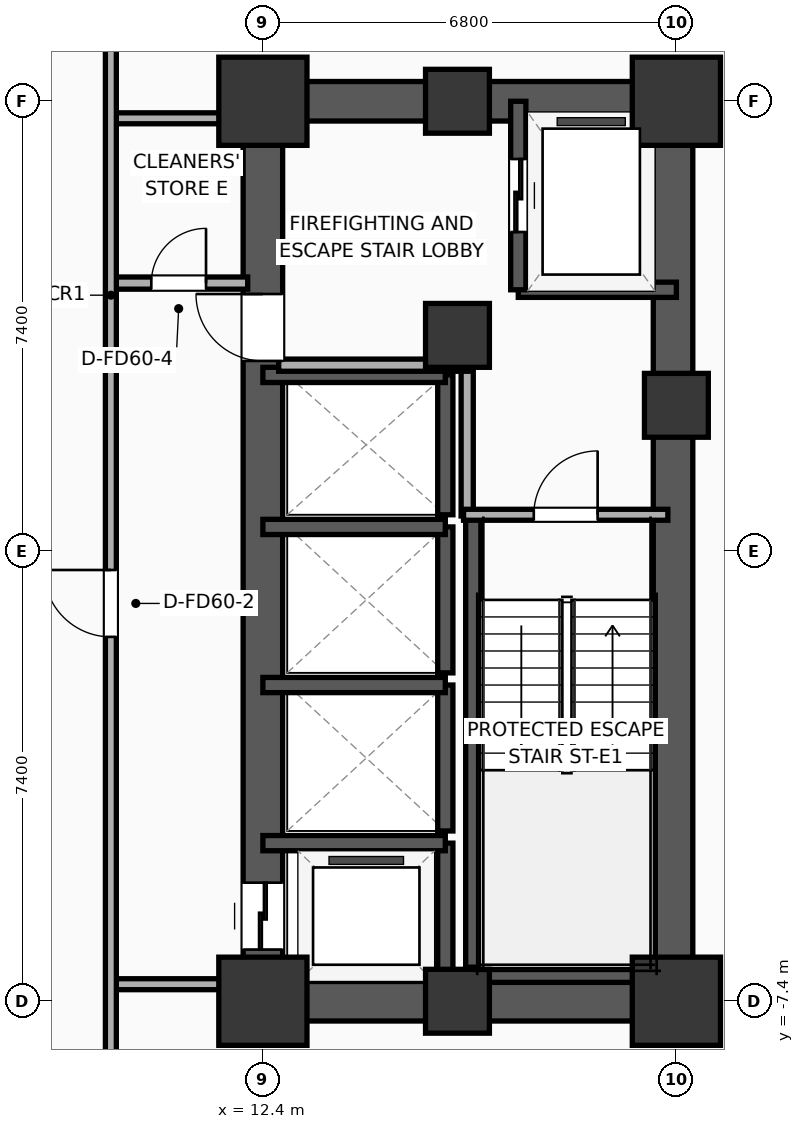
"""IFC4 building model, lengths in metres.
Left out: names, types, materials, properties, quantities, classifications, styles, units other than length and angle.
Written with IfcOpenShell. Run it as: python <this file> out.ifc"""

import sys

from ifc_helpers import new_model, si_unit, direction, frame, frame_2d, origin, origin_2d, place, context, subcontext, project, spatial, rectangle, extrude, element, fill, save


model = new_model("IFC4")
c1 = context("Model", 3, precision=1e-05, world=origin(), true_north=direction((0.0, 1.0)))
c2 = subcontext(c1, "Body", "Model", "MODEL_VIEW")
j1 = project(units=[si_unit("LENGTHUNIT", "METRE"), si_unit("PLANEANGLEUNIT", "RADIAN")], contexts=[c1])
p1 = place(None, origin())
s1 = spatial("IfcSite", under=j1, at=p1, CompositionType="ELEMENT")
p2 = place(p1, origin())
s2 = spatial("IfcBuilding", under=s1, at=p2, CompositionType="ELEMENT")
p3 = place(p2, frame((0.0, 0.0, 45.5)))
s3 = spatial("IfcBuildingStorey", under=s2, at=p3, CompositionType="ELEMENT", Elevation=45.5)
p4 = place(p3, frame((12.4, -7.4, 0.0), z_axis=(0.0, 0.0, 1.0), x_axis=(1.0, 0.0, 0.0)))
e1 = element("IfcColumn", 1, at=p4, inside=s3, PredefinedType="COLUMN", context=c2, shape_type="SweptSolid", body=[
    extrude(rectangle(XDim=1.45, YDim=1.45, at=origin_2d()), origin(), (0.0, 0.0, 1.0), 3.9),
])
p5 = place(p3, frame((15.6, 3.55, 0.0), z_axis=(0.0, 0.0, 1.0), x_axis=(1.0, 0.0, 0.0)))
e2 = element("IfcColumn", 2, at=p5, inside=s3, PredefinedType="COLUMN", context=c2, shape_type="SweptSolid", body=[
    extrude(rectangle(XDim=1.05, YDim=1.05, at=origin_2d()), origin(), (0.0, 0.0, 1.0), 3.9),
])
p6 = place(p3, frame((12.4, 7.4, 0.0), z_axis=(0.0, 0.0, 1.0), x_axis=(1.0, 0.0, 0.0)))
e3 = element("IfcColumn", 3, at=p6, inside=s3, PredefinedType="COLUMN", context=c2, shape_type="SweptSolid", body=[
    extrude(rectangle(XDim=1.45, YDim=1.45, at=origin_2d()), origin(), (0.0, 0.0, 1.0), 3.9),
])
for number, where, z_axis, x_axis in (
    (4, (15.6, -7.4, 0.0), (0.0, 0.0, 1.0), (1.0, 0.0, 0.0)),
    (5, (15.6, 7.4, 0.0), (0.0, 0.0, 1.0), (1.0, 0.0, 0.0)),
):
    element("IfcColumn", number, at=place(p3, frame(where, z_axis=z_axis, x_axis=x_axis)), inside=s3, PredefinedType="COLUMN", context=c2, shape_type="SweptSolid", body=[
        extrude(rectangle(XDim=1.05, YDim=1.05, at=origin_2d()), origin(), (0.0, 0.0, 1.0), 3.9),
    ])
p7 = place(p3, frame((19.2, -7.4, 0.0), z_axis=(0.0, 0.0, 1.0), x_axis=(1.0, 0.0, 0.0)))
e6 = element("IfcColumn", 6, at=p7, inside=s3, PredefinedType="COLUMN", context=c2, shape_type="SweptSolid", body=[
    extrude(rectangle(XDim=1.45, YDim=1.45, at=origin_2d()), origin(), (0.0, 0.0, 1.0), 3.9),
])
p8 = place(p3, frame((19.2, 2.4, 0.0), z_axis=(0.0, 0.0, 1.0), x_axis=(1.0, 0.0, 0.0)))
e7 = element("IfcColumn", 7, at=p8, inside=s3, PredefinedType="COLUMN", context=c2, shape_type="SweptSolid", body=[
    extrude(rectangle(XDim=1.05, YDim=1.05, at=origin_2d()), origin(), (0.0, 0.0, 1.0), 3.9),
])
p9 = place(p3, frame((19.2, 7.4, 0.0), z_axis=(0.0, 0.0, 1.0), x_axis=(1.0, 0.0, 0.0)))
e8 = element("IfcColumn", 8, at=p9, inside=s3, PredefinedType="COLUMN", context=c2, shape_type="SweptSolid", body=[
    extrude(rectangle(XDim=1.45, YDim=1.45, at=origin_2d()), origin(), (0.0, 0.0, 1.0), 3.9),
])
for number, where, z_axis, x_axis in (
    (9, (12.075, -7.4, 0.0), (0.0, 0.0, 1.0), (1.0, 0.0, 0.0)),
    (10, (12.075, 7.4, 0.0), (0.0, 0.0, 1.0), (1.0, 0.0, 0.0)),
):
    element("IfcWall", number, at=place(p3, frame(where, z_axis=z_axis, x_axis=x_axis)), inside=s3, PredefinedType="SHEAR", context=c2, shape_type="SweptSolid", body=[
        extrude(rectangle(XDim=7.45, YDim=0.65, at=frame_2d((3.725, 0.0))), origin(), (0.0, 0.0, 1.0), 3.65),
    ])
p10 = place(p3, frame((12.4, -7.4, 0.0), z_axis=(0.0, 0.0, 1.0), x_axis=(0.0, 1.0, 0.0)))
e11 = element("IfcWall", 11, at=p10, inside=s3, PredefinedType="SHEAR", context=c2, shape_type="SweptSolid", body=[
    extrude(rectangle(XDim=14.8, YDim=0.65, at=frame_2d((7.4, 0.0))), origin(), (0.0, 0.0, 1.0), 3.65),
])
p11 = place(p10, frame((0.85, 0.0, 0.0)))
e12 = element("IfcOpeningElement", 12, at=p11, cuts=e11, PredefinedType="OPENING", context=c2, shape_type="SweptSolid", body=[
    extrude(rectangle(XDim=1.1, YDim=2.05, at=frame_2d((0.55, 1.025))), frame((0.0, 0.335, 0.0), z_axis=(0.0, -1.0, 0.0), x_axis=(1.0, 0.0, 0.0)), (0.0, 0.0, 1.0), 0.67),
])
p12 = place(p10, frame((10.53, 0.0, 0.0)))
e13 = element("IfcOpeningElement", 13, at=p12, cuts=e11, PredefinedType="OPENING", context=c2, shape_type="SweptSolid", body=[
    extrude(rectangle(XDim=1.1, YDim=2.05, at=frame_2d((0.55, 1.025))), frame((0.0, 0.335, 0.0), z_axis=(0.0, -1.0, 0.0), x_axis=(1.0, 0.0, 0.0)), (0.0, 0.0, 1.0), 0.67),
])
p13 = place(p3, frame((19.145, -7.4, 0.0), z_axis=(0.0, 0.0, 1.0), x_axis=(0.0, 1.0, 0.0)))
e14 = element("IfcWall", 14, at=p13, inside=s3, PredefinedType="SHEAR", context=c2, shape_type="SweptSolid", body=[
    extrude(rectangle(XDim=14.8, YDim=0.65, at=frame_2d((7.4, 0.0))), origin(), (0.0, 0.0, 1.0), 3.65),
])
p14 = place(p3, frame((15.86, -7.085, 0.0), z_axis=(0.0, 0.0, 1.0), x_axis=(0.0, 1.0, 0.0)))
e15 = element("IfcWall", 15, at=p14, inside=s3, PredefinedType="SOLIDWALL", context=c2, shape_type="SweptSolid", body=[
    extrude(rectangle(XDim=7.685, YDim=0.25, at=frame_2d((3.843, 0.0))), origin(), (0.0, 0.0, 1.0), 3.65),
])
p15 = place(p3, frame((15.74, -6.965, 0.0), z_axis=(0.0, 0.0, 1.0), x_axis=(1.0, 0.0, 0.0)))
e16 = element("IfcWall", 16, at=p15, inside=s3, PredefinedType="SOLIDWALL", context=c2, shape_type="SweptSolid", body=[
    extrude(rectangle(XDim=3.46, YDim=0.25, at=frame_2d((1.73, 0.0))), origin(), (0.0, 0.0, 1.0), 3.65),
])
p16 = place(p3, frame((16.6, 4.3, 0.0), z_axis=(0.0, 0.0, 1.0), x_axis=(1.0, 0.0, 0.0)))
e17 = element("IfcWall", 17, at=p16, inside=s3, PredefinedType="SOLIDWALL", context=c2, shape_type="SweptSolid", body=[
    extrude(rectangle(XDim=2.6, YDim=0.25, at=frame_2d((1.3, 0.0))), origin(), (0.0, 0.0, 1.0), 3.65),
])
p17 = place(p3, frame((16.6, 7.4, 0.0), z_axis=(0.0, 0.0, 1.0), x_axis=(0.0, -1.0, 0.0)))
e18 = element("IfcWall", 18, at=p17, inside=s3, PredefinedType="SOLIDWALL", context=c2, shape_type="SweptSolid", body=[
    extrude(rectangle(XDim=3.1, YDim=0.25, at=frame_2d((1.55, 0.0))), origin(), (0.0, 0.0, 1.0), 3.65),
])
p18 = place(p17, frame((0.95, 0.0, 0.0)))
e19 = element("IfcOpeningElement", 19, at=p18, cuts=e18, PredefinedType="OPENING", context=c2, shape_type="SweptSolid", body=[
    extrude(rectangle(XDim=1.2, YDim=2.05, at=frame_2d((0.6, 1.025))), frame((0.0, 0.135, 0.0), z_axis=(0.0, -1.0, 0.0), x_axis=(1.0, 0.0, 0.0)), (0.0, 0.0, 1.0), 0.27),
])
p19 = place(p3, frame((15.4, -7.4, 0.0), z_axis=(0.0, 0.0, 1.0), x_axis=(0.0, 1.0, 0.0)))
e20 = element("IfcWall", 20, at=p19, inside=s3, PredefinedType="SOLIDWALL", context=c2, shape_type="SweptSolid", body=[
    extrude(rectangle(XDim=2.6, YDim=0.25, at=frame_2d((1.3, 0.0))), origin(), (0.0, 0.0, 1.0), 3.65),
])
p20 = place(p3, frame((15.4, -4.8, 0.0), z_axis=(0.0, 0.0, 1.0), x_axis=(-1.0, 0.0, 0.0)))
e21 = element("IfcWall", 21, at=p20, inside=s3, PredefinedType="SOLIDWALL", context=c2, shape_type="SweptSolid", body=[
    extrude(rectangle(XDim=3.0, YDim=0.25, at=frame_2d((1.5, 0.0))), origin(), (0.0, 0.0, 1.0), 3.65),
])
p21 = place(p3, frame((15.4, -4.6, 0.0), z_axis=(0.0, 0.0, 1.0), x_axis=(0.0, 1.0, 0.0)))
e22 = element("IfcWall", 22, at=p21, inside=s3, PredefinedType="SOLIDWALL", context=c2, shape_type="SweptSolid", body=[
    extrude(rectangle(XDim=2.4, YDim=0.25, at=frame_2d((1.2, 0.0))), origin(), (0.0, 0.0, 1.0), 3.65),
])
p22 = place(p3, frame((15.4, -2.2, 0.0), z_axis=(0.0, 0.0, 1.0), x_axis=(-1.0, 0.0, 0.0)))
e23 = element("IfcWall", 23, at=p22, inside=s3, PredefinedType="SOLIDWALL", context=c2, shape_type="SweptSolid", body=[
    extrude(rectangle(XDim=3.0, YDim=0.25, at=frame_2d((1.5, 0.0))), origin(), (0.0, 0.0, 1.0), 3.65),
])
p23 = place(p3, frame((15.4, -2.0, 0.0), z_axis=(0.0, 0.0, 1.0), x_axis=(0.0, 1.0, 0.0)))
e24 = element("IfcWall", 24, at=p23, inside=s3, PredefinedType="SOLIDWALL", context=c2, shape_type="SweptSolid", body=[
    extrude(rectangle(XDim=2.4, YDim=0.25, at=frame_2d((1.2, 0.0))), origin(), (0.0, 0.0, 1.0), 3.65),
])
p24 = place(p3, frame((15.4, 0.4, 0.0), z_axis=(0.0, 0.0, 1.0), x_axis=(-1.0, 0.0, 0.0)))
e25 = element("IfcWall", 25, at=p24, inside=s3, PredefinedType="SOLIDWALL", context=c2, shape_type="SweptSolid", body=[
    extrude(rectangle(XDim=3.0, YDim=0.25, at=frame_2d((1.5, 0.0))), origin(), (0.0, 0.0, 1.0), 3.65),
])
p25 = place(p3, frame((15.4, 0.6, 0.0), z_axis=(0.0, 0.0, 1.0), x_axis=(0.0, 1.0, 0.0)))
e26 = element("IfcWall", 26, at=p25, inside=s3, PredefinedType="SOLIDWALL", context=c2, shape_type="SweptSolid", body=[
    extrude(rectangle(XDim=2.3, YDim=0.25, at=frame_2d((1.15, 0.0))), origin(), (0.0, 0.0, 1.0), 3.65),
])
p26 = place(p3, frame((15.4, 2.9, 0.0), z_axis=(0.0, 0.0, 1.0), x_axis=(-1.0, 0.0, 0.0)))
e27 = element("IfcWall", 27, at=p26, inside=s3, PredefinedType="SOLIDWALL", context=c2, shape_type="SweptSolid", body=[
    extrude(rectangle(XDim=3.0, YDim=0.25, at=frame_2d((1.5, 0.0))), origin(), (0.0, 0.0, 1.0), 3.65),
])
p27 = place(p3, frame((15.76, 0.58, 0.0), z_axis=(0.0, 0.0, 1.0), x_axis=(0.0, 1.0, 0.0)))
e28 = element("IfcWall", 28, at=p27, inside=s3, PredefinedType="PARTITIONING", context=c2, shape_type="SweptSolid", body=[
    extrude(rectangle(XDim=2.52, YDim=0.2, at=frame_2d((1.26, 0.0))), origin(), (0.0, 0.0, 1.0), 3.65),
])
p28 = place(p3, frame((12.66, 3.06, 0.0), z_axis=(0.0, 0.0, 1.0), x_axis=(1.0, 0.0, 0.0)))
e29 = element("IfcWall", 29, at=p28, inside=s3, PredefinedType="PARTITIONING", context=c2, shape_type="SweptSolid", body=[
    extrude(rectangle(XDim=3.16, YDim=0.2, at=frame_2d((1.58, 0.0))), origin(), (0.0, 0.0, 1.0), 3.65),
])
p29 = place(p3, frame((15.7, 0.6, 0.0), z_axis=(0.0, 0.0, 1.0), x_axis=(1.0, 0.0, 0.0)))
e30 = element("IfcWall", 30, at=p29, inside=s3, PredefinedType="PARTITIONING", context=c2, shape_type="SweptSolid", body=[
    extrude(rectangle(XDim=3.36, YDim=0.18, at=frame_2d((1.68, 0.0))), origin(), (0.0, 0.0, 1.0), 3.65),
])
p30 = place(p29, frame((1.155, 0.0, 0.0)))
e31 = element("IfcOpeningElement", 31, at=p30, cuts=e30, PredefinedType="OPENING", context=c2, shape_type="SweptSolid", body=[
    extrude(rectangle(XDim=1.05, YDim=2.05, at=frame_2d((0.525, 1.025))), frame((0.0, 0.1, 0.0), z_axis=(0.0, -1.0, 0.0), x_axis=(1.0, 0.0, 0.0)), (0.0, 0.0, 1.0), 0.2),
])
p31 = place(p3, frame((9.88, 4.41, 0.0), z_axis=(0.0, 0.0, 1.0), x_axis=(1.0, 0.0, 0.0)))
e32 = element("IfcWall", 32, at=p31, inside=s3, PredefinedType="PARTITIONING", context=c2, shape_type="SweptSolid", body=[
    extrude(rectangle(XDim=2.27, YDim=0.2, at=frame_2d((1.135, 0.0))), origin(), (0.0, 0.0, 1.0), 3.65),
])
p32 = place(p31, frame((0.685, 0.0, 0.0)))
e33 = element("IfcOpeningElement", 33, at=p32, cuts=e32, PredefinedType="OPENING", context=c2, shape_type="SweptSolid", body=[
    extrude(rectangle(XDim=0.9, YDim=2.05, at=frame_2d((0.45, 1.025))), frame((0.0, 0.11, 0.0), z_axis=(0.0, -1.0, 0.0), x_axis=(1.0, 0.0, 0.0)), (0.0, 0.0, 1.0), 0.22),
])
for number, where, z_axis, x_axis in (
    (34, (9.88, 7.12, 0.0), (0.0, 0.0, 1.0), (1.0, 0.0, 0.0)),
    (35, (9.88, -7.12, 0.0), (0.0, 0.0, 1.0), (1.0, 0.0, 0.0)),
):
    element("IfcWall", number, at=place(p3, frame(where, z_axis=z_axis, x_axis=x_axis)), inside=s3, PredefinedType="PARTITIONING", context=c2, shape_type="SweptSolid", body=[
        extrude(rectangle(XDim=2.27, YDim=0.18, at=frame_2d((1.135, 0.0))), origin(), (0.0, 0.0, 1.0), 2.94),
    ])
p33 = place(p3, frame((9.9, -8.58, 0.0), z_axis=(0.0, 0.0, 1.0), x_axis=(0.0, 1.0, 0.0)))
e36 = element("IfcWall", 36, at=p33, inside=s3, PredefinedType="PARTITIONING", context=c2, shape_type="SweptSolid", body=[
    extrude(rectangle(XDim=17.16, YDim=0.18, at=frame_2d((8.58, 0.0))), origin(), (0.0, 0.0, 1.0), 3.65),
])
p34 = place(p33, frame((7.172, 0.0, 0.0)))
e37 = element("IfcOpeningElement", 37, at=p34, cuts=e36, PredefinedType="OPENING", context=c2, shape_type="SweptSolid", body=[
    extrude(rectangle(XDim=1.1, YDim=2.05, at=frame_2d((0.55, 1.025))), frame((0.0, 0.1, 0.0), z_axis=(0.0, -1.0, 0.0), x_axis=(1.0, 0.0, 0.0)), (0.0, 0.0, 1.0), 0.2),
])
p35 = place(p18, origin())
e38 = element("IfcDoor", 38, at=p35, inside=s3, OperationType="SLIDING_TO_LEFT", PredefinedType="DOOR", context=c2, shape_type="SweptSolid", body=[
    extrude(rectangle(XDim=1.2, YDim=2.05, at=frame_2d((0.6, 1.025))), frame((0.0, 0.025, 0.0), z_axis=(0.0, -1.0, 0.0), x_axis=(1.0, 0.0, 0.0)), (0.0, 0.0, 1.0), 0.05),
])
fill(e19, e38)
p36 = place(p11, origin())
e39 = element("IfcDoor", 39, at=p36, inside=s3, OperationType="SLIDING_TO_LEFT", PredefinedType="DOOR", context=c2, shape_type="SweptSolid", body=[
    extrude(rectangle(XDim=1.1, YDim=2.05, at=frame_2d((0.55, 1.025))), frame((0.0, 0.025, 0.0), z_axis=(0.0, -1.0, 0.0), x_axis=(1.0, 0.0, 0.0)), (0.0, 0.0, 1.0), 0.05),
])
fill(e12, e39)
p37 = place(p30, origin())
e40 = element("IfcDoor", 40, at=p37, inside=s3, OperationType="SINGLE_SWING_RIGHT", PredefinedType="DOOR", context=c2, shape_type="SweptSolid", body=[
    extrude(rectangle(XDim=1.05, YDim=2.05, at=frame_2d((0.525, 1.025))), frame((0.0, 0.025, 0.0), z_axis=(0.0, -1.0, 0.0), x_axis=(1.0, 0.0, 0.0)), (0.0, 0.0, 1.0), 0.05),
])
fill(e31, e40)
p38 = place(p32, origin())
e41 = element("IfcDoor", 41, at=p38, inside=s3, OperationType="SINGLE_SWING_RIGHT", PredefinedType="DOOR", context=c2, shape_type="SweptSolid", body=[
    extrude(rectangle(XDim=0.9, YDim=2.05, at=frame_2d((0.45, 1.025))), frame((0.0, 0.025, 0.0), z_axis=(0.0, -1.0, 0.0), x_axis=(1.0, 0.0, 0.0)), (0.0, 0.0, 1.0), 0.05),
])
fill(e33, e41)
p39 = place(p34, origin())
e42 = element("IfcDoor", 42, at=p39, inside=s3, OperationType="SINGLE_SWING_RIGHT", PredefinedType="DOOR", context=c2, shape_type="SweptSolid", body=[
    extrude(rectangle(XDim=1.1, YDim=2.05, at=frame_2d((0.55, 1.025))), frame((0.0, 0.025, 0.0), z_axis=(0.0, -1.0, 0.0), x_axis=(1.0, 0.0, 0.0)), (0.0, 0.0, 1.0), 0.05),
])
fill(e37, e42)
p40 = place(p12, origin())
e43 = element("IfcDoor", 43, at=p40, inside=s3, OperationType="SINGLE_SWING_RIGHT", PredefinedType="DOOR", context=c2, shape_type="SweptSolid", body=[
    extrude(rectangle(XDim=1.1, YDim=2.05, at=frame_2d((0.55, 1.025))), frame((0.0, 0.025, 0.0), z_axis=(0.0, -1.0, 0.0), x_axis=(1.0, 0.0, 0.0)), (0.0, 0.0, 1.0), 0.05),
])
fill(e13, e43)
save(model, sys.argv[1])
